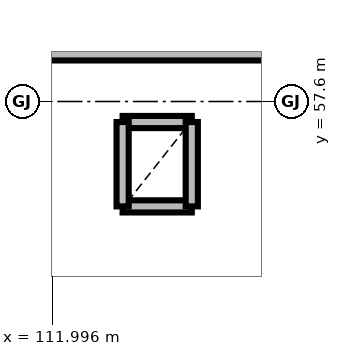
"""IFC4 building model, lengths in metres.
Left out: names, types, materials, properties, quantities, classifications, styles, units other than length and angle.
Written with IfcOpenShell. Run it as: python <this file> out.ifc"""

import sys

from ifc_helpers import new_model, si_unit, direction, frame, frame_2d, origin, place, context, subcontext, project, spatial, rectangle, extrude, element, save


model = new_model("IFC4")
c1 = context("Model", 3, precision=1e-05, world=origin(), true_north=direction((0.0, 1.0)))
c2 = subcontext(c1, "Body", "Model", "MODEL_VIEW")
j1 = project(units=[si_unit("LENGTHUNIT", "METRE"), si_unit("PLANEANGLEUNIT", "RADIAN")], contexts=[c1])
p1 = place(None, origin())
s1 = spatial("IfcSite", under=j1, at=p1, CompositionType="ELEMENT")
p2 = place(p1, origin())
s2 = spatial("IfcBuilding", under=s1, at=p2, CompositionType="ELEMENT")
p3 = place(p2, origin())
s3 = spatial("IfcBuildingStorey", under=s2, at=p3, CompositionType="ELEMENT", Elevation=0.0)
p4 = place(p3, frame((112.92, 56.22, 0.0), z_axis=(0.0, 0.0, 1.0), x_axis=(1.0, 0.0, 0.0)))
e1 = element("IfcWall", 1, at=p4, inside=s3, PredefinedType="PARTITIONING", context=c2, shape_type="SweptSolid", body=[
    extrude(rectangle(XDim=0.91, YDim=0.16, at=frame_2d((0.455, 0.0))), origin(), (0.0, 0.0, 1.0), 4.55),
])
p5 = place(p3, frame((113.83, 57.33, 0.0), z_axis=(0.0, 0.0, 1.0), x_axis=(-1.0, 0.0, 0.0)))
e2 = element("IfcWall", 2, at=p5, inside=s3, PredefinedType="PARTITIONING", context=c2, shape_type="SweptSolid", body=[
    extrude(rectangle(XDim=0.91, YDim=0.16, at=frame_2d((0.455, 0.0))), origin(), (0.0, 0.0, 1.0), 4.005),
])
for number, where, z_axis, x_axis in (
    (3, (112.92, 57.33, 0.0), (0.0, 0.0, 1.0), (0.0, -1.0, 0.0)),
    (4, (113.83, 56.22, 0.0), (0.0, 0.0, 1.0), (0.0, 1.0, 0.0)),
):
    element("IfcWall", number, at=place(p3, frame(where, z_axis=z_axis, x_axis=x_axis)), inside=s3, PredefinedType="PARTITIONING", context=c2, shape_type="SweptSolid", body=[
        extrude(rectangle(XDim=1.11, YDim=0.16, at=frame_2d((0.555, 0.0))), origin(), (0.0, 0.0, 1.0), 4.005),
    ])
p6 = place(p3, frame((126.0, 58.25, 0.0), z_axis=(0.0, 0.0, 1.0), x_axis=(-1.0, 0.0, 0.0)))
e5 = element("IfcWall", 5, at=p6, inside=s3, PredefinedType="SOLIDWALL", context=c2, shape_type="SweptSolid", body=[
    extrude(rectangle(XDim=22.91, YDim=0.22, at=frame_2d((11.455, 0.0))), origin(), (0.0, 0.0, 1.0), 4.105),
])
save(model, sys.argv[1])
